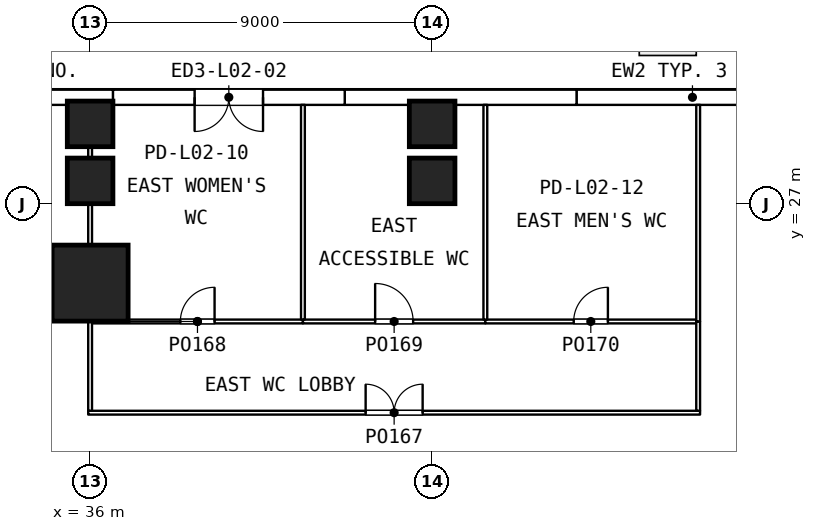
"""IFC4 building model, lengths in metres.
Left out: names, types, materials, properties, quantities, classifications, styles, units other than length and angle.
Written with IfcOpenShell. Run it as: python <this file> out.ifc"""

import sys

from ifc_helpers import new_model, si_unit, direction, frame, frame_2d, origin, origin_2d, place, context, subcontext, project, spatial, rectangle, extrude, element, fill, save


model = new_model("IFC4")
c1 = context("Model", 3, precision=1e-05, world=origin(), true_north=direction((0.0, 1.0)))
c2 = subcontext(c1, "Body", "Model", "MODEL_VIEW")
j1 = project(units=[si_unit("LENGTHUNIT", "METRE"), si_unit("PLANEANGLEUNIT", "RADIAN")], contexts=[c1])
p1 = place(None, origin())
s1 = spatial("IfcSite", under=j1, at=p1, CompositionType="ELEMENT")
p2 = place(p1, origin())
s2 = spatial("IfcBuilding", under=s1, at=p2, CompositionType="ELEMENT")
p3 = place(p2, frame((0.0, 0.0, 12.6)))
s3 = spatial("IfcBuildingStorey", under=s2, at=p3, CompositionType="ELEMENT", Elevation=12.6)
for number, where, z_axis, x_axis in (
    (1, (36.0, 27.6, 0.0), (0.0, 0.0, 1.0), (1.0, 0.0, 0.0)),
    (2, (36.0, 29.1, 0.0), (0.0, 0.0, 1.0), (1.0, 0.0, 0.0)),
    (3, (45.0, 27.6, 0.0), (0.0, 0.0, 1.0), (1.0, 0.0, 0.0)),
    (4, (45.0, 29.1, 0.0), (0.0, 0.0, 1.0), (1.0, 0.0, 0.0)),
):
    element("IfcColumn", number, at=place(p3, frame(where, z_axis=z_axis, x_axis=x_axis)), inside=s3, PredefinedType="COLUMN", context=c2, shape_type="SweptSolid", body=[
        extrude(rectangle(XDim=1.2, YDim=1.2, at=origin_2d()), origin(), (0.0, 0.0, 1.0), 5.4),
    ])
p4 = place(p3, frame((36.0, 24.91, 0.0), z_axis=(0.0, 0.0, 1.0), x_axis=(0.0, 1.0, 0.0)))
e5 = element("IfcColumn", 5, at=p4, inside=s3, PredefinedType="COLUMN", context=c2, shape_type="SweptSolid", body=[
    extrude(rectangle(XDim=2.0, YDim=2.0, at=origin_2d()), origin(), (0.0, 0.0, 1.0), 5.4),
])
p5 = place(p3, frame((54.9, 29.8, 0.0), z_axis=(0.0, 0.0, 1.0), x_axis=(-1.0, 0.0, 0.0)))
e6 = element("IfcWall", 6, at=p5, inside=s3, PredefinedType="SOLIDWALL", context=c2, shape_type="SweptSolid", body=[
    extrude(rectangle(XDim=6.1, YDim=0.4, at=frame_2d((3.05, 0.0))), origin(), (0.0, 0.0, 1.0), 5.1),
])
p6 = place(p3, frame((48.8, 29.8, 0.0), z_axis=(0.0, 0.0, 1.0), x_axis=(-1.0, 0.0, 0.0)))
e7 = element("IfcWall", 7, at=p6, inside=s3, PredefinedType="SOLIDWALL", context=c2, shape_type="SweptSolid", body=[
    extrude(rectangle(XDim=6.1, YDim=0.4, at=frame_2d((3.05, 0.0))), origin(), (0.0, 0.0, 1.0), 5.1),
])
p7 = place(p3, frame((42.7, 29.8, 0.0), z_axis=(0.0, 0.0, 1.0), x_axis=(-1.0, 0.0, 0.0)))
e8 = element("IfcWall", 8, at=p7, inside=s3, PredefinedType="SOLIDWALL", context=c2, shape_type="SweptSolid", body=[
    extrude(rectangle(XDim=6.1, YDim=0.4, at=frame_2d((3.05, 0.0))), origin(), (0.0, 0.0, 1.0), 5.1),
])
p8 = place(p7, frame((2.15, 0.0, 0.0)))
e9 = element("IfcOpeningElement", 9, at=p8, cuts=e8, PredefinedType="OPENING", context=c2, shape_type="SweptSolid", body=[
    extrude(rectangle(XDim=1.8, YDim=2.4, at=frame_2d((0.9, 1.2))), frame((0.0, 0.21, 0.0), z_axis=(0.0, -1.0, 0.0), x_axis=(1.0, 0.0, 0.0)), (0.0, 0.0, 1.0), 0.42),
])
p9 = place(p3, frame((36.6, 29.8, 0.0), z_axis=(0.0, 0.0, 1.0), x_axis=(-1.0, 0.0, 0.0)))
e10 = element("IfcWall", 10, at=p9, inside=s3, PredefinedType="SOLIDWALL", context=c2, shape_type="SweptSolid", body=[
    extrude(rectangle(XDim=6.1, YDim=0.4, at=frame_2d((3.05, 0.0))), origin(), (0.0, 0.0, 1.0), 5.1),
])
p10 = place(p9, frame((2.3, 0.0, 1.0)))
e11 = element("IfcOpeningElement", 11, at=p10, cuts=e10, PredefinedType="OPENING", context=c2, shape_type="SweptSolid", body=[
    extrude(rectangle(XDim=1.5, YDim=2.4, at=frame_2d((0.75, 1.2))), frame((0.0, 0.21, 0.0), z_axis=(0.0, -1.0, 0.0), x_axis=(1.0, 0.0, 0.0)), (0.0, 0.0, 1.0), 0.42),
])
p11 = place(p3, frame((36.05, 23.9, 0.0), z_axis=(0.0, 0.0, 1.0), x_axis=(1.0, 0.0, 0.0)))
e12 = element("IfcWall", 12, at=p11, inside=s3, PredefinedType="PARTITIONING", context=c2, shape_type="SweptSolid", body=[
    extrude(rectangle(XDim=5.55, YDim=0.1, at=frame_2d((2.775, 0.0))), origin(), (0.0, 0.0, 1.0), 5.1),
])
p12 = place(p11, frame((2.325, 0.0, 0.0)))
e13 = element("IfcOpeningElement", 13, at=p12, cuts=e12, PredefinedType="OPENING", context=c2, shape_type="SweptSolid", body=[
    extrude(rectangle(XDim=0.9, YDim=2.1, at=frame_2d((0.45, 1.05))), frame((0.0, 0.06, 0.0), z_axis=(0.0, -1.0, 0.0), x_axis=(1.0, 0.0, 0.0)), (0.0, 0.0, 1.0), 0.12),
])
p13 = place(p3, frame((41.6, 23.9, 0.0), z_axis=(0.0, 0.0, 1.0), x_axis=(1.0, 0.0, 0.0)))
e14 = element("IfcWall", 14, at=p13, inside=s3, PredefinedType="PARTITIONING", context=c2, shape_type="SweptSolid", body=[
    extrude(rectangle(XDim=4.8, YDim=0.1, at=frame_2d((2.4, 0.0))), origin(), (0.0, 0.0, 1.0), 5.1),
])
p14 = place(p13, frame((1.9, 0.0, 0.0)))
e15 = element("IfcOpeningElement", 15, at=p14, cuts=e14, PredefinedType="OPENING", context=c2, shape_type="SweptSolid", body=[
    extrude(rectangle(XDim=1.0, YDim=2.1, at=frame_2d((0.5, 1.05))), frame((0.0, 0.06, 0.0), z_axis=(0.0, -1.0, 0.0), x_axis=(1.0, 0.0, 0.0)), (0.0, 0.0, 1.0), 0.12),
])
p15 = place(p3, frame((46.4, 23.9, 0.0), z_axis=(0.0, 0.0, 1.0), x_axis=(1.0, 0.0, 0.0)))
e16 = element("IfcWall", 16, at=p15, inside=s3, PredefinedType="PARTITIONING", context=c2, shape_type="SweptSolid", body=[
    extrude(rectangle(XDim=5.55, YDim=0.1, at=frame_2d((2.775, 0.0))), origin(), (0.0, 0.0, 1.0), 5.1),
])
p16 = place(p15, frame((2.325, 0.0, 0.0)))
e17 = element("IfcOpeningElement", 17, at=p16, cuts=e16, PredefinedType="OPENING", context=c2, shape_type="SweptSolid", body=[
    extrude(rectangle(XDim=0.9, YDim=2.1, at=frame_2d((0.45, 1.05))), frame((0.0, 0.06, 0.0), z_axis=(0.0, -1.0, 0.0), x_axis=(1.0, 0.0, 0.0)), (0.0, 0.0, 1.0), 0.12),
])
p17 = place(p3, frame((35.95, 21.5, 0.0), z_axis=(0.0, 0.0, 1.0), x_axis=(1.0, 0.0, 0.0)))
e18 = element("IfcWall", 18, at=p17, inside=s3, PredefinedType="PARTITIONING", context=c2, shape_type="SweptSolid", body=[
    extrude(rectangle(XDim=16.1, YDim=0.1, at=frame_2d((8.05, 0.0))), origin(), (0.0, 0.0, 1.0), 5.1),
])
p18 = place(p17, frame((7.3, 0.0, 0.0)))
e19 = element("IfcOpeningElement", 19, at=p18, cuts=e18, PredefinedType="OPENING", context=c2, shape_type="SweptSolid", body=[
    extrude(rectangle(XDim=1.5, YDim=2.1, at=frame_2d((0.75, 1.05))), frame((0.0, 0.06, 0.0), z_axis=(0.0, -1.0, 0.0), x_axis=(1.0, 0.0, 0.0)), (0.0, 0.0, 1.0), 0.12),
])
p19 = place(p3, frame((36.0, 21.55, 0.0), z_axis=(0.0, 0.0, 1.0), x_axis=(0.0, 1.0, 0.0)))
e20 = element("IfcWall", 20, at=p19, inside=s3, PredefinedType="PARTITIONING", context=c2, shape_type="SweptSolid", body=[
    extrude(rectangle(XDim=2.35, YDim=0.1, at=frame_2d((1.175, 0.0))), origin(), (0.0, 0.0, 1.0), 4.5),
])
p20 = place(p3, frame((52.0, 21.55, 0.0), z_axis=(0.0, 0.0, 1.0), x_axis=(0.0, 1.0, 0.0)))
e21 = element("IfcWall", 21, at=p20, inside=s3, PredefinedType="PARTITIONING", context=c2, shape_type="SweptSolid", body=[
    extrude(rectangle(XDim=2.35, YDim=0.1, at=frame_2d((1.175, 0.0))), origin(), (0.0, 0.0, 1.0), 5.1),
])
p21 = place(p3, frame((41.6, 23.95, 0.0), z_axis=(0.0, 0.0, 1.0), x_axis=(0.0, 1.0, 0.0)))
e22 = element("IfcWall", 22, at=p21, inside=s3, PredefinedType="PARTITIONING", context=c2, shape_type="SweptSolid", body=[
    extrude(rectangle(XDim=5.65, YDim=0.1, at=frame_2d((2.825, 0.0))), origin(), (0.0, 0.0, 1.0), 5.1),
])
p22 = place(p3, frame((36.0, 23.9, 0.0), z_axis=(0.0, 0.0, 1.0), x_axis=(0.0, 1.0, 0.0)))
e23 = element("IfcWall", 23, at=p22, inside=s3, PredefinedType="PARTITIONING", context=c2, shape_type="SweptSolid", body=[
    extrude(rectangle(XDim=5.7, YDim=0.1, at=frame_2d((2.85, 0.0))), origin(), (0.0, 0.0, 1.0), 4.5),
])
p23 = place(p3, frame((46.4, 23.95, 0.0), z_axis=(0.0, 0.0, 1.0), x_axis=(0.0, 1.0, 0.0)))
e24 = element("IfcWall", 24, at=p23, inside=s3, PredefinedType="PARTITIONING", context=c2, shape_type="SweptSolid", body=[
    extrude(rectangle(XDim=5.65, YDim=0.1, at=frame_2d((2.825, 0.0))), origin(), (0.0, 0.0, 1.0), 5.1),
])
p24 = place(p3, frame((52.0, 23.9, 0.0), z_axis=(0.0, 0.0, 1.0), x_axis=(0.0, 1.0, 0.0)))
e25 = element("IfcWall", 25, at=p24, inside=s3, PredefinedType="PARTITIONING", context=c2, shape_type="SweptSolid", body=[
    extrude(rectangle(XDim=5.7, YDim=0.1, at=frame_2d((2.85, 0.0))), origin(), (0.0, 0.0, 1.0), 5.1),
])
p25 = place(p8, origin())
e26 = element("IfcDoor", 26, at=p25, inside=s3, OperationType="SINGLE_SWING_LEFT", PredefinedType="DOOR", context=c2, shape_type="SweptSolid", body=[
    extrude(rectangle(XDim=1.8, YDim=2.4, at=frame_2d((0.9, 1.2))), frame((0.0, 0.025, 0.0), z_axis=(0.0, -1.0, 0.0), x_axis=(1.0, 0.0, 0.0)), (0.0, 0.0, 1.0), 0.05),
])
fill(e9, e26)
p26 = place(p18, origin())
e27 = element("IfcDoor", 27, at=p26, inside=s3, OperationType="DOUBLE_DOOR_DOUBLE_SWING", PredefinedType="DOOR", context=c2, shape_type="SweptSolid", body=[
    extrude(rectangle(XDim=1.5, YDim=2.1, at=frame_2d((0.75, 1.05))), frame((0.0, 0.025, 0.0), z_axis=(0.0, -1.0, 0.0), x_axis=(1.0, 0.0, 0.0)), (0.0, 0.0, 1.0), 0.05),
])
fill(e19, e27)
p27 = place(p12, origin())
e28 = element("IfcDoor", 28, at=p27, inside=s3, OperationType="SINGLE_SWING_RIGHT", PredefinedType="DOOR", context=c2, shape_type="SweptSolid", body=[
    extrude(rectangle(XDim=0.9, YDim=2.1, at=frame_2d((0.45, 1.05))), frame((0.0, 0.025, 0.0), z_axis=(0.0, -1.0, 0.0), x_axis=(1.0, 0.0, 0.0)), (0.0, 0.0, 1.0), 0.05),
])
fill(e13, e28)
p28 = place(p14, origin())
e29 = element("IfcDoor", 29, at=p28, inside=s3, OperationType="SINGLE_SWING_LEFT", PredefinedType="DOOR", context=c2, shape_type="SweptSolid", body=[
    extrude(rectangle(XDim=1.0, YDim=2.1, at=frame_2d((0.5, 1.05))), frame((0.0, 0.025, 0.0), z_axis=(0.0, -1.0, 0.0), x_axis=(1.0, 0.0, 0.0)), (0.0, 0.0, 1.0), 0.05),
])
fill(e15, e29)
p29 = place(p16, origin())
e30 = element("IfcDoor", 30, at=p29, inside=s3, OperationType="SINGLE_SWING_RIGHT", PredefinedType="DOOR", context=c2, shape_type="SweptSolid", body=[
    extrude(rectangle(XDim=0.9, YDim=2.1, at=frame_2d((0.45, 1.05))), frame((0.0, 0.025, 0.0), z_axis=(0.0, -1.0, 0.0), x_axis=(1.0, 0.0, 0.0)), (0.0, 0.0, 1.0), 0.05),
])
fill(e17, e30)
save(model, sys.argv[1])
